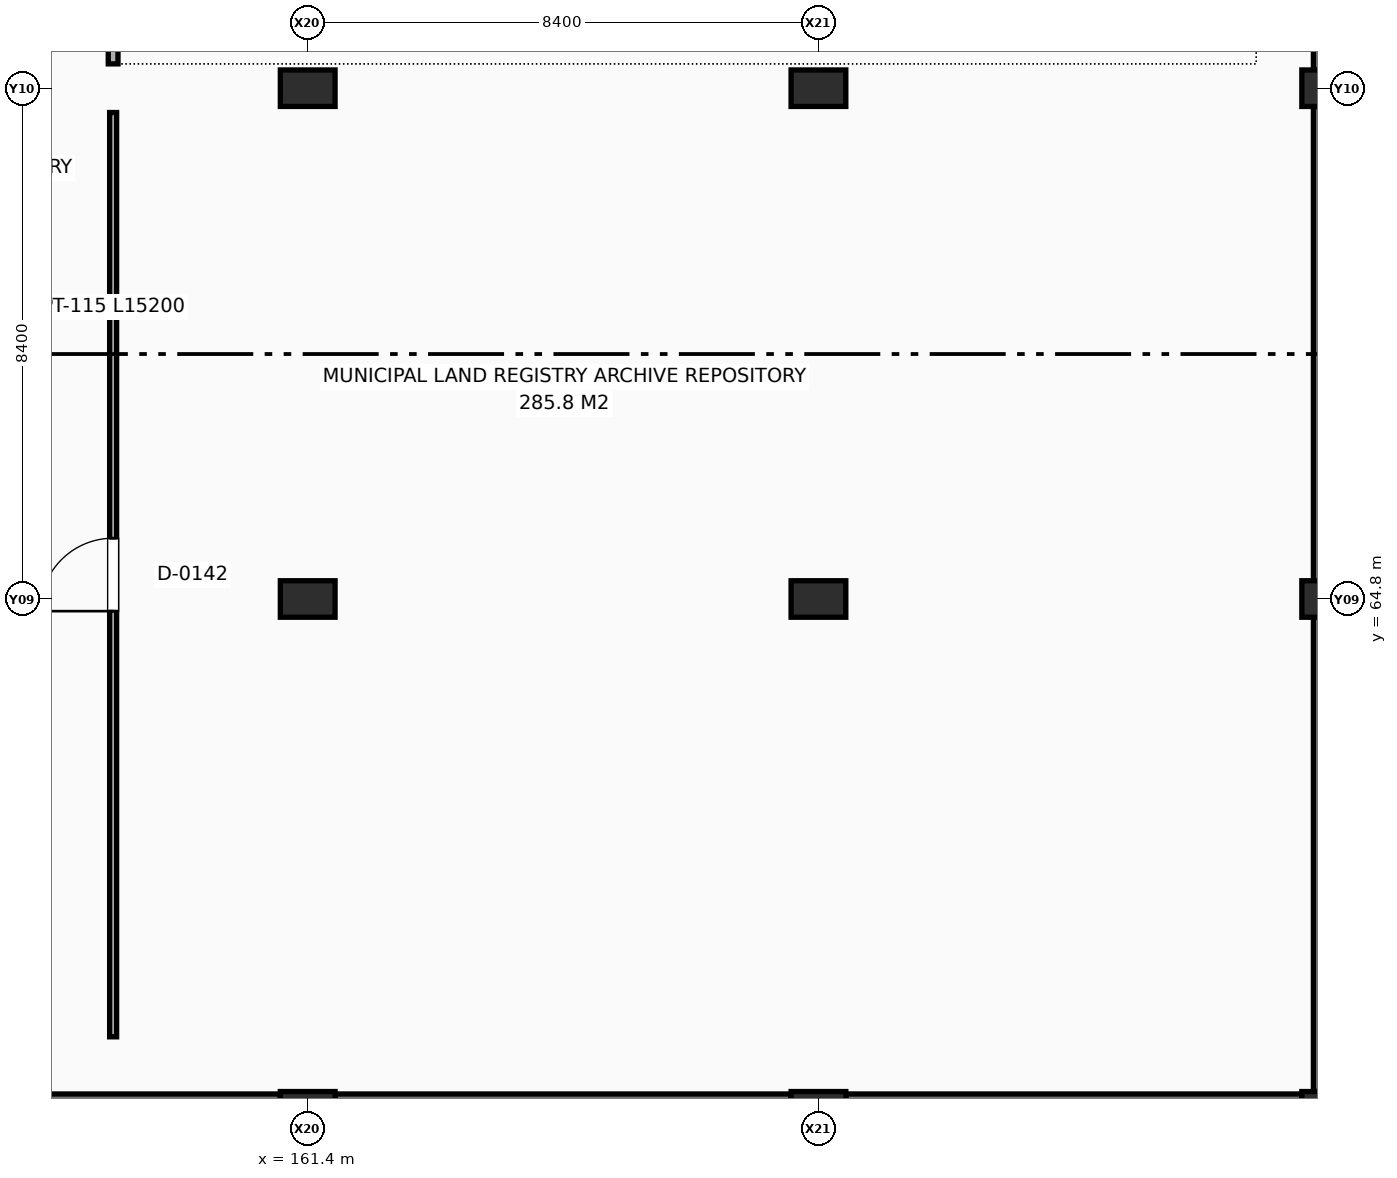
"""IFC4 building model, lengths in metres.
Left out: names, types, materials, properties, quantities, classifications, styles, units other than length and angle.
Written with IfcOpenShell. Run it as: python <this file> out.ifc"""

import sys

from ifc_helpers import new_model, si_unit, direction, frame, frame_2d, origin, origin_2d, place, context, subcontext, project, spatial, rectangle, extrude, element, fill, save


model = new_model("IFC4")
c1 = context("Model", 3, precision=1e-05, world=origin(), true_north=direction((0.0, 1.0)))
c2 = subcontext(c1, "Body", "Model", "MODEL_VIEW")
j1 = project(units=[si_unit("LENGTHUNIT", "METRE"), si_unit("PLANEANGLEUNIT", "RADIAN")], contexts=[c1])
p1 = place(None, origin())
s1 = spatial("IfcSite", under=j1, at=p1, CompositionType="ELEMENT")
p2 = place(p1, origin())
s2 = spatial("IfcBuilding", under=s1, at=p2, CompositionType="ELEMENT")
p3 = place(p2, frame((0.0, 0.0, -4.2)))
s3 = spatial("IfcBuildingStorey", under=s2, at=p3, CompositionType="ELEMENT", Elevation=-4.2)
for number, where, z_axis, x_axis in (
    (1, (161.4, 56.4, 0.0), (0.0, 0.0, 1.0), (1.0, 0.0, 0.0)),
    (2, (161.4, 64.8, 0.0), (0.0, 0.0, 1.0), (1.0, 0.0, 0.0)),
    (3, (161.4, 73.2, 0.0), (0.0, 0.0, 1.0), (1.0, 0.0, 0.0)),
    (4, (169.8, 56.4, 0.0), (0.0, 0.0, 1.0), (1.0, 0.0, 0.0)),
    (5, (169.8, 64.8, 0.0), (0.0, 0.0, 1.0), (1.0, 0.0, 0.0)),
    (6, (169.8, 73.2, 0.0), (0.0, 0.0, 1.0), (1.0, 0.0, 0.0)),
    (7, (178.2, 56.4, 0.0), (0.0, 0.0, 1.0), (1.0, 0.0, 0.0)),
    (8, (178.2, 64.8, 0.0), (0.0, 0.0, 1.0), (1.0, 0.0, 0.0)),
    (9, (178.2, 73.2, 0.0), (0.0, 0.0, 1.0), (1.0, 0.0, 0.0)),
):
    element("IfcColumn", number, at=place(p3, frame(where, z_axis=z_axis, x_axis=x_axis)), inside=s3, PredefinedType="COLUMN", context=c2, shape_type="SweptSolid", body=[
        extrude(rectangle(XDim=0.9, YDim=0.6, at=origin_2d()), origin(), (0.0, 0.0, 1.0), 4.2),
    ])
p4 = place(p3, frame((153.452, 56.4, 0.0), z_axis=(0.0, 0.0, 1.0), x_axis=(1.0, 0.0, 0.0)))
e10 = element("IfcWall", 10, at=p4, inside=s3, PredefinedType="SOLIDWALL", context=c2, shape_type="SweptSolid", body=[
    extrude(rectangle(XDim=7.496, YDim=0.52, at=frame_2d((3.748, 0.0))), origin(), (0.0, 0.0, 1.0), 3.86),
])
p5 = place(p3, frame((161.852, 56.4, 0.0), z_axis=(0.0, 0.0, 1.0), x_axis=(1.0, 0.0, 0.0)))
e11 = element("IfcWall", 11, at=p5, inside=s3, PredefinedType="SOLIDWALL", context=c2, shape_type="SweptSolid", body=[
    extrude(rectangle(XDim=7.496, YDim=0.52, at=frame_2d((3.748, 0.0))), origin(), (0.0, 0.0, 1.0), 3.86),
])
p6 = place(p3, frame((170.252, 56.4, 0.0), z_axis=(0.0, 0.0, 1.0), x_axis=(1.0, 0.0, 0.0)))
e12 = element("IfcWall", 12, at=p6, inside=s3, PredefinedType="SOLIDWALL", context=c2, shape_type="SweptSolid", body=[
    extrude(rectangle(XDim=7.496, YDim=0.52, at=frame_2d((3.748, 0.0))), origin(), (0.0, 0.0, 1.0), 3.86),
])
p7 = place(p3, frame((178.2, 56.702, 0.0), z_axis=(0.0, 0.0, 1.0), x_axis=(0.0, 1.0, 0.0)))
e13 = element("IfcWall", 13, at=p7, inside=s3, PredefinedType="SOLIDWALL", context=c2, shape_type="SweptSolid", body=[
    extrude(rectangle(XDim=7.796, YDim=0.52, at=frame_2d((3.898, 0.0))), origin(), (0.0, 0.0, 1.0), 3.86),
])
p8 = place(p3, frame((178.2, 65.102, 0.0), z_axis=(0.0, 0.0, 1.0), x_axis=(0.0, 1.0, 0.0)))
e14 = element("IfcWall", 14, at=p8, inside=s3, PredefinedType="SOLIDWALL", context=c2, shape_type="SweptSolid", body=[
    extrude(rectangle(XDim=7.796, YDim=0.52, at=frame_2d((3.898, 0.0))), origin(), (0.0, 0.0, 1.0), 3.86),
])
p9 = place(p3, frame((178.2, 73.502, 0.0), z_axis=(0.0, 0.0, 1.0), x_axis=(0.0, 1.0, 0.0)))
e15 = element("IfcWall", 15, at=p9, inside=s3, PredefinedType="SOLIDWALL", context=c2, shape_type="SweptSolid", body=[
    extrude(rectangle(XDim=7.796, YDim=0.52, at=frame_2d((3.898, 0.0))), origin(), (0.0, 0.0, 1.0), 3.86),
])
p10 = place(p3, frame((158.2, 57.6, 0.0), z_axis=(0.0, 0.0, 1.0), x_axis=(0.0, 1.0, 0.0)))
e16 = element("IfcWall", 16, at=p10, inside=s3, PredefinedType="PARTITIONING", context=c2, shape_type="SweptSolid", body=[
    extrude(rectangle(XDim=15.2, YDim=0.115, at=frame_2d((7.6, 0.0))), origin(), (0.0, 0.0, 1.0), 3.86),
])
p11 = place(p10, frame((7.0, 0.0, 0.0)))
e17 = element("IfcOpeningElement", 17, at=p11, cuts=e16, PredefinedType="OPENING", context=c2, shape_type="SweptSolid", body=[
    extrude(rectangle(XDim=1.2, YDim=2.2, at=frame_2d((0.6, 1.1))), frame((0.0, 0.067, 0.0), z_axis=(0.0, -1.0, 0.0), x_axis=(1.0, 0.0, 0.0)), (0.0, 0.0, 1.0), 0.135),
])
p12 = place(p3, frame((158.2, 73.6, 0.0), z_axis=(0.0, 0.0, 1.0), x_axis=(0.0, 1.0, 0.0)))
e18 = element("IfcWall", 18, at=p12, inside=s3, PredefinedType="PARTITIONING", context=c2, shape_type="SweptSolid", body=[
    extrude(rectangle(XDim=16.0, YDim=0.16, at=frame_2d((8.0, 0.0))), origin(), (0.0, 0.0, 1.0), 3.86),
])
p13 = place(p12, frame((7.45, 0.0, 0.0)))
e19 = element("IfcOpeningElement", 19, at=p13, cuts=e18, PredefinedType="OPENING", context=c2, shape_type="SweptSolid", body=[
    extrude(rectangle(XDim=1.1, YDim=2.15, at=frame_2d((0.55, 1.075))), frame((0.0, 0.09, 0.0), z_axis=(0.0, -1.0, 0.0), x_axis=(1.0, 0.0, 0.0)), (0.0, 0.0, 1.0), 0.18),
])
p14 = place(p11, origin())
e20 = element("IfcDoor", 20, at=p14, inside=s3, OperationType="SINGLE_SWING_LEFT", PredefinedType="DOOR", context=c2, shape_type="SweptSolid", body=[
    extrude(rectangle(XDim=1.2, YDim=2.2, at=frame_2d((0.6, 1.1))), frame((0.0, 0.025, 0.0), z_axis=(0.0, -1.0, 0.0), x_axis=(1.0, 0.0, 0.0)), (0.0, 0.0, 1.0), 0.05),
])
fill(e17, e20)
save(model, sys.argv[1])
